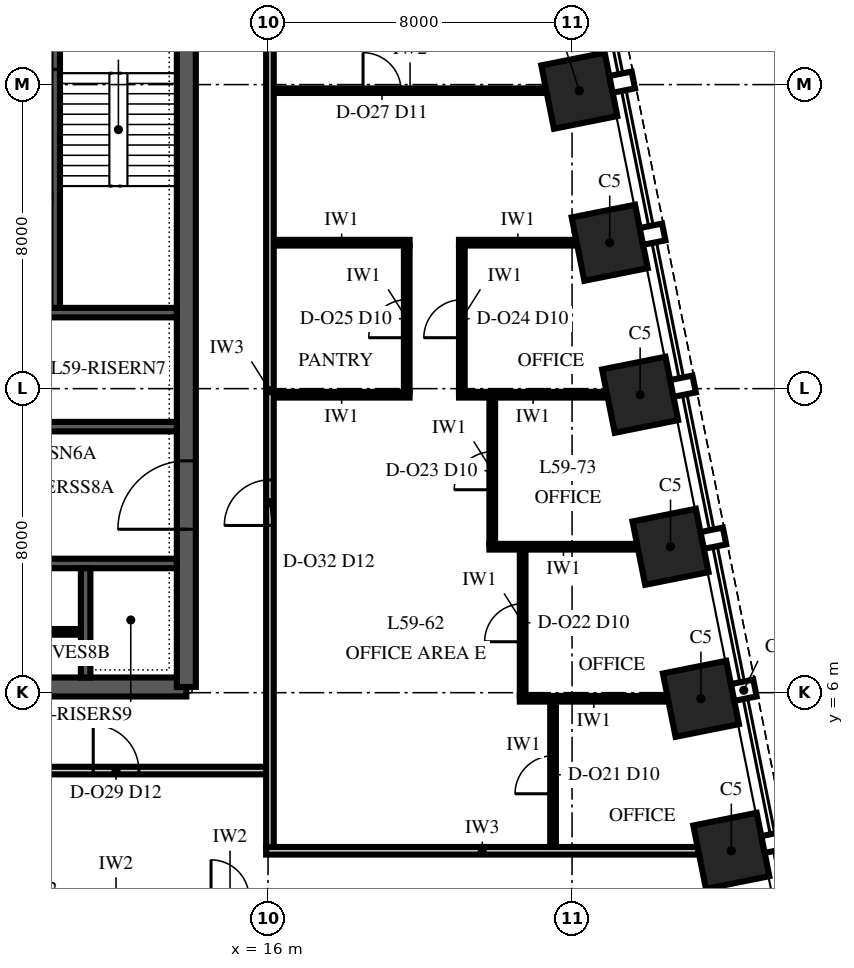
"""IFC4 building model, lengths in metres.
Left out: names, types, materials, properties, quantities, classifications, styles, units other than length and angle.
Written with IfcOpenShell. Run it as: python <this file> out.ifc"""

import sys

from ifc_helpers import new_model, si_unit, direction, frame, frame_2d, origin, origin_2d, place, context, subcontext, project, spatial, polyline, rectangle, outline, extrude, element, fill, save


model = new_model("IFC4")
c1 = context("Model", 3, precision=1e-05, world=origin(), true_north=direction((0.0, 1.0)))
c2 = subcontext(c1, "Body", "Model", "MODEL_VIEW")
j1 = project(units=[si_unit("LENGTHUNIT", "METRE"), si_unit("PLANEANGLEUNIT", "RADIAN")], contexts=[c1])
p1 = place(None, origin())
s1 = spatial("IfcSite", under=j1, at=p1, CompositionType="ELEMENT")
p2 = place(p1, origin())
s2 = spatial("IfcBuilding", under=s1, at=p2, CompositionType="ELEMENT")
p3 = place(p2, frame((0.0, 0.0, 256.0)))
s3 = spatial("IfcBuildingStorey", under=s2, at=p3, CompositionType="ELEMENT", Elevation=256.0)
for number, where, z_axis, x_axis in (
    (1, (28.191, 1.838, 0.0), (0.0, 0.0, 1.0), (-0.196, 0.981, 0.0)),
    (2, (27.391, 5.838, 0.0), (0.0, 0.0, 1.0), (-0.196, 0.981, 0.0)),
    (3, (26.591, 9.838, 0.0), (0.0, 0.0, 1.0), (-0.196, 0.981, 0.0)),
    (4, (25.791, 13.838, 0.0), (0.0, 0.0, 1.0), (-0.196, 0.981, 0.0)),
    (5, (24.991, 17.838, 0.0), (0.0, 0.0, 1.0), (-0.196, 0.981, 0.0)),
    (6, (24.191, 21.838, 0.0), (0.0, 0.0, 1.0), (-0.196, 0.981, 0.0)),
):
    element("IfcColumn", number, at=place(p3, frame(where, z_axis=z_axis, x_axis=x_axis)), inside=s3, PredefinedType="COLUMN", context=c2, shape_type="SweptSolid", body=[
        extrude(rectangle(XDim=1.7, YDim=1.7, at=origin_2d()), origin(), (0.0, 0.0, 1.0), 4.0),
    ])
p4 = place(p3, frame((-13.85, 6.15, 0.0), z_axis=(0.0, 0.0, 1.0), x_axis=(1.0, 0.0, 0.0)))
e7 = element("IfcWall", 7, at=p4, inside=s3, PredefinedType="SHEAR", context=c2, shape_type="SweptSolid", body=[
    extrude(rectangle(XDim=27.7, YDim=0.5, at=frame_2d((13.85, 0.0))), origin(), (0.0, 0.0, 1.0), 4.0),
])
p5 = place(p3, frame((13.85, 6.15, 0.0), z_axis=(0.0, 0.0, 1.0), x_axis=(0.0, 1.0, 0.0)))
e8 = element("IfcWall", 8, at=p5, inside=s3, PredefinedType="SHEAR", context=c2, shape_type="SweptSolid", body=[
    extrude(outline(polyline([(0.0, -0.25), (17.7, -0.25), (17.7, 0.0), (17.45, 0.0), (17.45, 0.25), (0.25, 0.25), (0.25, 0.0), (0.0, 0.0), (0.0, -0.25)])), origin(), (0.0, 0.0, 1.0), 4.0),
])
p6 = place(p5, frame((4.15, 0.0, 0.0)))
e9 = element("IfcOpeningElement", 9, at=p6, cuts=e8, PredefinedType="OPENING", context=c2, shape_type="SweptSolid", body=[
    extrude(rectangle(XDim=1.8, YDim=2.4, at=frame_2d((0.9, 1.2))), frame((0.0, 0.265, 0.0), z_axis=(0.0, -1.0, 0.0), x_axis=(1.0, 0.0, 0.0)), (0.0, 0.0, 1.0), 0.53),
])
p7 = place(p3, frame((-13.6, 9.4, 0.0), z_axis=(0.0, 0.0, 1.0), x_axis=(1.0, 0.0, 0.0)))
e10 = element("IfcWall", 10, at=p7, inside=s3, PredefinedType="SHEAR", context=c2, shape_type="SweptSolid", body=[
    extrude(rectangle(XDim=27.2, YDim=0.25, at=frame_2d((13.6, 0.0))), origin(), (0.0, 0.0, 1.0), 4.0),
])
p8 = place(p7, frame((8.85, 0.0, 0.0)))
e11 = element("IfcOpeningElement", 11, at=p8, cuts=e10, PredefinedType="OPENING", context=c2, shape_type="SweptSolid", body=[
    extrude(rectangle(XDim=1.1, YDim=2.1, at=frame_2d((0.55, 1.05))), frame((0.0, 0.14, 0.0), z_axis=(0.0, -1.0, 0.0), x_axis=(1.0, 0.0, 0.0)), (0.0, 0.0, 1.0), 0.28),
])
p9 = place(p7, frame((11.65, 0.0, 0.0)))
e12 = element("IfcOpeningElement", 12, at=p9, cuts=e10, PredefinedType="OPENING", context=c2, shape_type="SweptSolid", body=[
    extrude(rectangle(XDim=1.1, YDim=2.1, at=frame_2d((0.55, 1.05))), frame((0.0, 0.14, 0.0), z_axis=(0.0, -1.0, 0.0), x_axis=(1.0, 0.0, 0.0)), (0.0, 0.0, 1.0), 0.28),
])
p10 = place(p7, frame((14.45, 0.0, 0.0)))
e13 = element("IfcOpeningElement", 13, at=p10, cuts=e10, PredefinedType="OPENING", context=c2, shape_type="SweptSolid", body=[
    extrude(rectangle(XDim=1.1, YDim=2.1, at=frame_2d((0.55, 1.05))), frame((0.0, 0.14, 0.0), z_axis=(0.0, -1.0, 0.0), x_axis=(1.0, 0.0, 0.0)), (0.0, 0.0, 1.0), 0.28),
])
p11 = place(p7, frame((0.55, 0.0, 0.0)))
e14 = element("IfcOpeningElement", 14, at=p11, cuts=e10, PredefinedType="OPENING", context=c2, shape_type="SweptSolid", body=[
    extrude(rectangle(XDim=0.9, YDim=2.1, at=frame_2d((0.45, 1.05))), frame((0.0, 0.14, 0.0), z_axis=(0.0, -1.0, 0.0), x_axis=(1.0, 0.0, 0.0)), (0.0, 0.0, 1.0), 0.28),
])
p12 = place(p7, frame((3.35, 0.0, 0.0)))
e15 = element("IfcOpeningElement", 15, at=p12, cuts=e10, PredefinedType="OPENING", context=c2, shape_type="SweptSolid", body=[
    extrude(rectangle(XDim=0.9, YDim=2.1, at=frame_2d((0.45, 1.05))), frame((0.0, 0.14, 0.0), z_axis=(0.0, -1.0, 0.0), x_axis=(1.0, 0.0, 0.0)), (0.0, 0.0, 1.0), 0.28),
])
p13 = place(p7, frame((6.15, 0.0, 0.0)))
e16 = element("IfcOpeningElement", 16, at=p13, cuts=e10, PredefinedType="OPENING", context=c2, shape_type="SweptSolid", body=[
    extrude(rectangle(XDim=0.9, YDim=2.1, at=frame_2d((0.45, 1.05))), frame((0.0, 0.14, 0.0), z_axis=(0.0, -1.0, 0.0), x_axis=(1.0, 0.0, 0.0)), (0.0, 0.0, 1.0), 0.28),
])
p14 = place(p7, frame((17.35, 0.0, 0.0)))
e17 = element("IfcOpeningElement", 17, at=p14, cuts=e10, PredefinedType="OPENING", context=c2, shape_type="SweptSolid", body=[
    extrude(rectangle(XDim=0.9, YDim=2.1, at=frame_2d((0.45, 1.05))), frame((0.0, 0.14, 0.0), z_axis=(0.0, -1.0, 0.0), x_axis=(1.0, 0.0, 0.0)), (0.0, 0.0, 1.0), 0.28),
])
p15 = place(p7, frame((20.15, 0.0, 0.0)))
e18 = element("IfcOpeningElement", 18, at=p15, cuts=e10, PredefinedType="OPENING", context=c2, shape_type="SweptSolid", body=[
    extrude(rectangle(XDim=0.9, YDim=2.1, at=frame_2d((0.45, 1.05))), frame((0.0, 0.14, 0.0), z_axis=(0.0, -1.0, 0.0), x_axis=(1.0, 0.0, 0.0)), (0.0, 0.0, 1.0), 0.28),
])
p16 = place(p7, frame((22.95, 0.0, 0.0)))
e19 = element("IfcOpeningElement", 19, at=p16, cuts=e10, PredefinedType="OPENING", context=c2, shape_type="SweptSolid", body=[
    extrude(rectangle(XDim=0.9, YDim=2.1, at=frame_2d((0.45, 1.05))), frame((0.0, 0.14, 0.0), z_axis=(0.0, -1.0, 0.0), x_axis=(1.0, 0.0, 0.0)), (0.0, 0.0, 1.0), 0.28),
])
p17 = place(p3, frame((-13.6, 13.0, 0.0), z_axis=(0.0, 0.0, 1.0), x_axis=(1.0, 0.0, 0.0)))
e20 = element("IfcWall", 20, at=p17, inside=s3, PredefinedType="SHEAR", context=c2, shape_type="SweptSolid", body=[
    extrude(rectangle(XDim=27.2, YDim=0.25, at=frame_2d((13.6, 0.0))), origin(), (0.0, 0.0, 1.0), 4.0),
])
p18 = place(p17, frame((16.75, 0.0, 0.0)))
e21 = element("IfcOpeningElement", 21, at=p18, cuts=e20, PredefinedType="OPENING", context=c2, shape_type="SweptSolid", body=[
    extrude(rectangle(XDim=0.9, YDim=2.1, at=frame_2d((0.45, 1.05))), frame((0.0, 0.14, 0.0), z_axis=(0.0, -1.0, 0.0), x_axis=(1.0, 0.0, 0.0)), (0.0, 0.0, 1.0), 0.28),
])
p19 = place(p17, frame((21.15, 0.0, 0.0)))
e22 = element("IfcOpeningElement", 22, at=p19, cuts=e20, PredefinedType="OPENING", context=c2, shape_type="SweptSolid", body=[
    extrude(rectangle(XDim=0.9, YDim=2.1, at=frame_2d((0.45, 1.05))), frame((0.0, 0.14, 0.0), z_axis=(0.0, -1.0, 0.0), x_axis=(1.0, 0.0, 0.0)), (0.0, 0.0, 1.0), 0.28),
])
p20 = place(p17, frame((0.55, 0.0, 0.0)))
e23 = element("IfcOpeningElement", 23, at=p20, cuts=e20, PredefinedType="OPENING", context=c2, shape_type="SweptSolid", body=[
    extrude(rectangle(XDim=0.9, YDim=2.1, at=frame_2d((0.45, 1.05))), frame((0.0, 0.14, 0.0), z_axis=(0.0, -1.0, 0.0), x_axis=(1.0, 0.0, 0.0)), (0.0, 0.0, 1.0), 0.28),
])
p21 = place(p17, frame((3.35, 0.0, 0.0)))
e24 = element("IfcOpeningElement", 24, at=p21, cuts=e20, PredefinedType="OPENING", context=c2, shape_type="SweptSolid", body=[
    extrude(rectangle(XDim=0.9, YDim=2.1, at=frame_2d((0.45, 1.05))), frame((0.0, 0.14, 0.0), z_axis=(0.0, -1.0, 0.0), x_axis=(1.0, 0.0, 0.0)), (0.0, 0.0, 1.0), 0.28),
])
p22 = place(p17, frame((6.15, 0.0, 0.0)))
e25 = element("IfcOpeningElement", 25, at=p22, cuts=e20, PredefinedType="OPENING", context=c2, shape_type="SweptSolid", body=[
    extrude(rectangle(XDim=0.9, YDim=2.1, at=frame_2d((0.45, 1.05))), frame((0.0, 0.14, 0.0), z_axis=(0.0, -1.0, 0.0), x_axis=(1.0, 0.0, 0.0)), (0.0, 0.0, 1.0), 0.28),
])
p23 = place(p3, frame((-13.6, 16.0, 0.0), z_axis=(0.0, 0.0, 1.0), x_axis=(1.0, 0.0, 0.0)))
e26 = element("IfcWall", 26, at=p23, inside=s3, PredefinedType="SHEAR", context=c2, shape_type="SweptSolid", body=[
    extrude(rectangle(XDim=27.2, YDim=0.25, at=frame_2d((13.6, 0.0))), origin(), (0.0, 0.0, 1.0), 4.0),
])
p24 = place(p3, frame((11.2, 6.4, 0.0), z_axis=(0.0, 0.0, 1.0), x_axis=(0.0, 1.0, 0.0)))
e27 = element("IfcWall", 27, at=p24, inside=s3, PredefinedType="SHEAR", context=c2, shape_type="SweptSolid", body=[
    extrude(rectangle(XDim=2.875, YDim=0.25, at=frame_2d((1.438, 0.0))), origin(), (0.0, 0.0, 1.0), 4.0),
])
p25 = place(p3, frame((10.4, 16.125, 0.0), z_axis=(0.0, 0.0, 1.0), x_axis=(0.0, 1.0, 0.0)))
e28 = element("IfcWall", 28, at=p25, inside=s3, PredefinedType="SHEAR", context=c2, shape_type="SweptSolid", body=[
    extrude(rectangle(XDim=7.475, YDim=0.25, at=frame_2d((3.738, 0.0))), origin(), (0.0, 0.0, 1.0), 4.0),
])
p26 = place(p25, frame((6.275, 0.0, 0.0)))
e29 = element("IfcOpeningElement", 29, at=p26, cuts=e28, PredefinedType="OPENING", context=c2, shape_type="SweptSolid", body=[
    extrude(rectangle(XDim=1.0, YDim=2.1, at=frame_2d((0.5, 1.05))), frame((0.0, 0.14, 0.0), z_axis=(0.0, -1.0, 0.0), x_axis=(1.0, 0.0, 0.0)), (0.0, 0.0, 1.0), 0.28),
])
p27 = place(p3, frame((8.525, 7.6, 0.0), z_axis=(0.0, 0.0, 1.0), x_axis=(1.0, 0.0, 0.0)))
e30 = element("IfcWall", 30, at=p27, inside=s3, PredefinedType="PARTITIONING", context=c2, shape_type="SweptSolid", body=[
    extrude(rectangle(XDim=2.55, YDim=0.15, at=frame_2d((1.275, 0.0))), origin(), (0.0, 0.0, 1.0), 3.85),
])
p28 = place(p27, frame((0.825, 0.0, 0.0)))
e31 = element("IfcOpeningElement", 31, at=p28, cuts=e30, PredefinedType="OPENING", context=c2, shape_type="SweptSolid", body=[
    extrude(rectangle(XDim=0.9, YDim=2.1, at=frame_2d((0.45, 1.05))), frame((0.0, 0.09, 0.0), z_axis=(0.0, -1.0, 0.0), x_axis=(1.0, 0.0, 0.0)), (0.0, 0.0, 1.0), 0.18),
])
p29 = place(p3, frame((15.95, 1.84, 0.0), z_axis=(0.0, 0.0, 1.0), x_axis=(1.0, 0.0, 0.0)))
e32 = element("IfcWall", 32, at=p29, inside=s3, PredefinedType="PARTITIONING", context=c2, shape_type="SweptSolid", body=[
    extrude(rectangle(XDim=11.374, YDim=0.2, at=frame_2d((5.687, 0.0))), origin(), (0.0, 0.0, 1.0), 3.23),
])
p30 = place(p3, frame((-15.95, 3.95, 0.0), z_axis=(0.0, 0.0, 1.0), x_axis=(1.0, 0.0, 0.0)))
e33 = element("IfcWall", 33, at=p30, inside=s3, PredefinedType="PARTITIONING", context=c2, shape_type="SweptSolid", body=[
    extrude(rectangle(XDim=31.9, YDim=0.2, at=frame_2d((15.95, 0.0))), origin(), (0.0, 0.0, 1.0), 3.23),
])
p31 = place(p30, frame((3.35, 0.0, 0.0)))
e34 = element("IfcOpeningElement", 34, at=p31, cuts=e33, PredefinedType="OPENING", context=c2, shape_type="SweptSolid", body=[
    extrude(rectangle(XDim=1.2, YDim=2.4, at=frame_2d((0.6, 1.2))), frame((0.0, 0.115, 0.0), z_axis=(0.0, -1.0, 0.0), x_axis=(1.0, 0.0, 0.0)), (0.0, 0.0, 1.0), 0.23),
])
p32 = place(p30, frame((27.35, 0.0, 0.0)))
e35 = element("IfcOpeningElement", 35, at=p32, cuts=e33, PredefinedType="OPENING", context=c2, shape_type="SweptSolid", body=[
    extrude(rectangle(XDim=1.2, YDim=2.4, at=frame_2d((0.6, 1.2))), frame((0.0, 0.115, 0.0), z_axis=(0.0, -1.0, 0.0), x_axis=(1.0, 0.0, 0.0)), (0.0, 0.0, 1.0), 0.23),
])
p33 = place(p30, frame((15.35, 0.0, 0.0)))
e36 = element("IfcOpeningElement", 36, at=p33, cuts=e33, PredefinedType="OPENING", context=c2, shape_type="SweptSolid", body=[
    extrude(rectangle(XDim=1.2, YDim=2.4, at=frame_2d((0.6, 1.2))), frame((0.0, 0.115, 0.0), z_axis=(0.0, -1.0, 0.0), x_axis=(1.0, 0.0, 0.0)), (0.0, 0.0, 1.0), 0.23),
])
p34 = place(p3, frame((22.625, 5.84, 0.0), z_axis=(0.0, 0.0, 1.0), x_axis=(1.0, 0.0, 0.0)))
e37 = element("IfcWall", 37, at=p34, inside=s3, PredefinedType="PARTITIONING", context=c2, shape_type="SweptSolid", body=[
    extrude(rectangle(XDim=3.899, YDim=0.15, at=frame_2d((1.949, 0.0))), origin(), (0.0, 0.0, 1.0), 2.842),
])
p35 = place(p3, frame((21.825, 9.84, 0.0), z_axis=(0.0, 0.0, 1.0), x_axis=(1.0, 0.0, 0.0)))
e38 = element("IfcWall", 38, at=p35, inside=s3, PredefinedType="PARTITIONING", context=c2, shape_type="SweptSolid", body=[
    extrude(rectangle(XDim=3.899, YDim=0.15, at=frame_2d((1.949, 0.0))), origin(), (0.0, 0.0, 1.0), 3.23),
])
p36 = place(p3, frame((16.15, 13.84, 0.0), z_axis=(0.0, 0.0, 1.0), x_axis=(1.0, 0.0, 0.0)))
e39 = element("IfcWall", 39, at=p36, inside=s3, PredefinedType="PARTITIONING", context=c2, shape_type="SweptSolid", body=[
    extrude(rectangle(XDim=3.575, YDim=0.15, at=frame_2d((1.788, 0.0))), origin(), (0.0, 0.0, 1.0), 3.85),
])
p37 = place(p3, frame((21.025, 13.84, 0.0), z_axis=(0.0, 0.0, 1.0), x_axis=(1.0, 0.0, 0.0)))
e40 = element("IfcWall", 40, at=p37, inside=s3, PredefinedType="PARTITIONING", context=c2, shape_type="SweptSolid", body=[
    extrude(rectangle(XDim=3.899, YDim=0.15, at=frame_2d((1.949, 0.0))), origin(), (0.0, 0.0, 1.0), 3.23),
])
p38 = place(p3, frame((16.15, 17.84, 0.0), z_axis=(0.0, 0.0, 1.0), x_axis=(1.0, 0.0, 0.0)))
e41 = element("IfcWall", 41, at=p38, inside=s3, PredefinedType="PARTITIONING", context=c2, shape_type="SweptSolid", body=[
    extrude(rectangle(XDim=3.575, YDim=0.15, at=frame_2d((1.788, 0.0))), origin(), (0.0, 0.0, 1.0), 3.23),
])
p39 = place(p3, frame((21.025, 17.84, 0.0), z_axis=(0.0, 0.0, 1.0), x_axis=(1.0, 0.0, 0.0)))
e42 = element("IfcWall", 42, at=p39, inside=s3, PredefinedType="PARTITIONING", context=c2, shape_type="SweptSolid", body=[
    extrude(rectangle(XDim=3.099, YDim=0.15, at=frame_2d((1.549, 0.0))), origin(), (0.0, 0.0, 1.0), 3.23),
])
p40 = place(p3, frame((16.15, 21.84, 0.0), z_axis=(0.0, 0.0, 1.0), x_axis=(1.0, 0.0, 0.0)))
e43 = element("IfcWall", 43, at=p40, inside=s3, PredefinedType="PARTITIONING", context=c2, shape_type="SweptSolid", body=[
    extrude(rectangle(XDim=7.174, YDim=0.12, at=frame_2d((3.587, 0.0))), origin(), (0.0, 0.0, 1.0), 3.23),
])
p41 = place(p40, frame((2.35, 0.0, 0.0)))
e44 = element("IfcOpeningElement", 44, at=p41, cuts=e43, PredefinedType="OPENING", context=c2, shape_type="SweptSolid", body=[
    extrude(rectangle(XDim=1.0, YDim=2.4, at=frame_2d((0.5, 1.2))), frame((0.0, 0.075, 0.0), z_axis=(0.0, -1.0, 0.0), x_axis=(1.0, 0.0, 0.0)), (0.0, 0.0, 1.0), 0.15),
])
p42 = place(p3, frame((16.05, 1.94, 0.0), z_axis=(0.0, 0.0, 1.0), x_axis=(0.0, 1.0, 0.0)))
e45 = element("IfcWall", 45, at=p42, inside=s3, PredefinedType="PARTITIONING", context=c2, shape_type="SweptSolid", body=[
    extrude(rectangle(XDim=24.01, YDim=0.2, at=frame_2d((12.005, 0.0))), origin(), (0.0, 0.0, 1.0), 2.842),
])
p43 = place(p42, frame((8.46, 0.0, 0.0)))
e46 = element("IfcOpeningElement", 46, at=p43, cuts=e45, PredefinedType="OPENING", context=c2, shape_type="SweptSolid", body=[
    extrude(rectangle(XDim=1.2, YDim=2.4, at=frame_2d((0.6, 1.2))), frame((0.0, 0.115, 0.0), z_axis=(0.0, -1.0, 0.0), x_axis=(1.0, 0.0, 0.0)), (0.0, 0.0, 1.0), 0.23),
])
p44 = place(p3, frame((19.65, 13.915, 0.0), z_axis=(0.0, 0.0, 1.0), x_axis=(0.0, 1.0, 0.0)))
e47 = element("IfcWall", 47, at=p44, inside=s3, PredefinedType="PARTITIONING", context=c2, shape_type="SweptSolid", body=[
    extrude(rectangle(XDim=3.85, YDim=0.15, at=frame_2d((1.925, 0.0))), origin(), (0.0, 0.0, 1.0), 3.23),
])
p45 = place(p44, frame((1.425, 0.0, 0.0)))
e48 = element("IfcOpeningElement", 48, at=p45, cuts=e47, PredefinedType="OPENING", context=c2, shape_type="SweptSolid", body=[
    extrude(rectangle(XDim=1.0, YDim=2.3, at=frame_2d((0.5, 1.15))), frame((0.0, 0.09, 0.0), z_axis=(0.0, -1.0, 0.0), x_axis=(1.0, 0.0, 0.0)), (0.0, 0.0, 1.0), 0.18),
])
p46 = place(p3, frame((21.1, 13.915, 0.0), z_axis=(0.0, 0.0, 1.0), x_axis=(0.0, 1.0, 0.0)))
e49 = element("IfcWall", 49, at=p46, inside=s3, PredefinedType="PARTITIONING", context=c2, shape_type="SweptSolid", body=[
    extrude(rectangle(XDim=3.85, YDim=0.15, at=frame_2d((1.925, 0.0))), origin(), (0.0, 0.0, 1.0), 3.23),
])
p47 = place(p46, frame((1.425, 0.0, 0.0)))
e50 = element("IfcOpeningElement", 50, at=p47, cuts=e49, PredefinedType="OPENING", context=c2, shape_type="SweptSolid", body=[
    extrude(rectangle(XDim=1.0, YDim=2.3, at=frame_2d((0.5, 1.15))), frame((0.0, 0.09, 0.0), z_axis=(0.0, -1.0, 0.0), x_axis=(1.0, 0.0, 0.0)), (0.0, 0.0, 1.0), 0.18),
])
p48 = place(p3, frame((21.9, 9.915, 0.0), z_axis=(0.0, 0.0, 1.0), x_axis=(0.0, 1.0, 0.0)))
e51 = element("IfcWall", 51, at=p48, inside=s3, PredefinedType="PARTITIONING", context=c2, shape_type="SweptSolid", body=[
    extrude(rectangle(XDim=3.85, YDim=0.15, at=frame_2d((1.925, 0.0))), origin(), (0.0, 0.0, 1.0), 3.85),
])
p49 = place(p48, frame((1.425, 0.0, 0.0)))
e52 = element("IfcOpeningElement", 52, at=p49, cuts=e51, PredefinedType="OPENING", context=c2, shape_type="SweptSolid", body=[
    extrude(rectangle(XDim=1.0, YDim=2.3, at=frame_2d((0.5, 1.15))), frame((0.0, 0.09, 0.0), z_axis=(0.0, -1.0, 0.0), x_axis=(1.0, 0.0, 0.0)), (0.0, 0.0, 1.0), 0.18),
])
p50 = place(p3, frame((22.7, 5.915, 0.0), z_axis=(0.0, 0.0, 1.0), x_axis=(0.0, 1.0, 0.0)))
e53 = element("IfcWall", 53, at=p50, inside=s3, PredefinedType="PARTITIONING", context=c2, shape_type="SweptSolid", body=[
    extrude(rectangle(XDim=3.85, YDim=0.15, at=frame_2d((1.925, 0.0))), origin(), (0.0, 0.0, 1.0), 2.842),
])
p51 = place(p50, frame((1.425, 0.0, 0.0)))
e54 = element("IfcOpeningElement", 54, at=p51, cuts=e53, PredefinedType="OPENING", context=c2, shape_type="SweptSolid", body=[
    extrude(rectangle(XDim=1.0, YDim=2.3, at=frame_2d((0.5, 1.15))), frame((0.0, 0.09, 0.0), z_axis=(0.0, -1.0, 0.0), x_axis=(1.0, 0.0, 0.0)), (0.0, 0.0, 1.0), 0.18),
])
p52 = place(p3, frame((23.5, 1.94, 0.0), z_axis=(0.0, 0.0, 1.0), x_axis=(0.0, 1.0, 0.0)))
e55 = element("IfcWall", 55, at=p52, inside=s3, PredefinedType="PARTITIONING", context=c2, shape_type="SweptSolid", body=[
    extrude(rectangle(XDim=3.825, YDim=0.15, at=frame_2d((1.913, 0.0))), origin(), (0.0, 0.0, 1.0), 3.85),
])
p53 = place(p52, frame((1.4, 0.0, 0.0)))
e56 = element("IfcOpeningElement", 56, at=p53, cuts=e55, PredefinedType="OPENING", context=c2, shape_type="SweptSolid", body=[
    extrude(rectangle(XDim=1.0, YDim=2.3, at=frame_2d((0.5, 1.15))), frame((0.0, 0.09, 0.0), z_axis=(0.0, -1.0, 0.0), x_axis=(1.0, 0.0, 0.0)), (0.0, 0.0, 1.0), 0.18),
])
p54 = place(p6, origin())
e57 = element("IfcDoor", 57, at=p54, inside=s3, OperationType="DOUBLE_DOOR_SINGLE_SWING", PredefinedType="DOOR", context=c2, shape_type="SweptSolid", body=[
    extrude(rectangle(XDim=1.8, YDim=2.4, at=frame_2d((0.9, 1.2))), frame((0.0, 0.25, 0.0), z_axis=(0.0, -1.0, 0.0), x_axis=(1.0, 0.0, 0.0)), (0.0, 0.0, 1.0), 0.5),
])
fill(e9, e57)
p55 = place(p26, origin())
e58 = element("IfcDoor", 58, at=p55, inside=s3, OperationType="SINGLE_SWING_LEFT", PredefinedType="DOOR", context=c2, shape_type="SweptSolid", body=[
    extrude(rectangle(XDim=1.0, YDim=2.1, at=frame_2d((0.5, 1.05))), frame((0.0, 0.125, 0.0), z_axis=(0.0, -1.0, 0.0), x_axis=(1.0, 0.0, 0.0)), (0.0, 0.0, 1.0), 0.25),
])
fill(e29, e58)
p56 = place(p53, origin())
e59 = element("IfcDoor", 59, at=p56, inside=s3, OperationType="SINGLE_SWING_LEFT", PredefinedType="DOOR", context=c2, shape_type="SweptSolid", body=[
    extrude(rectangle(XDim=1.0, YDim=2.3, at=frame_2d((0.5, 1.15))), frame((0.0, 0.075, 0.0), z_axis=(0.0, -1.0, 0.0), x_axis=(1.0, 0.0, 0.0)), (0.0, 0.0, 1.0), 0.149),
])
fill(e56, e59)
p57 = place(p51, origin())
e60 = element("IfcDoor", 60, at=p57, inside=s3, OperationType="SINGLE_SWING_LEFT", PredefinedType="DOOR", context=c2, shape_type="SweptSolid", body=[
    extrude(rectangle(XDim=1.0, YDim=2.3, at=frame_2d((0.5, 1.15))), frame((0.0, 0.075, 0.0), z_axis=(0.0, -1.0, 0.0), x_axis=(1.0, 0.0, 0.0)), (0.0, 0.0, 1.0), 0.149),
])
fill(e54, e60)
p58 = place(p49, origin())
e61 = element("IfcDoor", 61, at=p58, inside=s3, OperationType="SINGLE_SWING_LEFT", PredefinedType="DOOR", context=c2, shape_type="SweptSolid", body=[
    extrude(rectangle(XDim=1.0, YDim=2.3, at=frame_2d((0.5, 1.15))), frame((0.0, 0.075, 0.0), z_axis=(0.0, -1.0, 0.0), x_axis=(1.0, 0.0, 0.0)), (0.0, 0.0, 1.0), 0.149),
])
fill(e52, e61)
p59 = place(p47, origin())
e62 = element("IfcDoor", 62, at=p59, inside=s3, OperationType="SINGLE_SWING_LEFT", PredefinedType="DOOR", context=c2, shape_type="SweptSolid", body=[
    extrude(rectangle(XDim=1.0, YDim=2.3, at=frame_2d((0.5, 1.15))), frame((0.0, 0.075, 0.0), z_axis=(0.0, -1.0, 0.0), x_axis=(1.0, 0.0, 0.0)), (0.0, 0.0, 1.0), 0.149),
])
fill(e50, e62)
p60 = place(p45, origin())
e63 = element("IfcDoor", 63, at=p60, inside=s3, OperationType="SINGLE_SWING_LEFT", PredefinedType="DOOR", context=c2, shape_type="SweptSolid", body=[
    extrude(rectangle(XDim=1.0, YDim=2.3, at=frame_2d((0.5, 1.15))), frame((0.0, 0.075, 0.0), z_axis=(0.0, -1.0, 0.0), x_axis=(1.0, 0.0, 0.0)), (0.0, 0.0, 1.0), 0.149),
])
fill(e48, e63)
p61 = place(p41, origin())
e64 = element("IfcDoor", 64, at=p61, inside=s3, OperationType="SINGLE_SWING_RIGHT", PredefinedType="DOOR", context=c2, shape_type="SweptSolid", body=[
    extrude(rectangle(XDim=1.0, YDim=2.4, at=frame_2d((0.5, 1.2))), frame((0.0, 0.06, 0.0), z_axis=(0.0, -1.0, 0.0), x_axis=(1.0, 0.0, 0.0)), (0.0, 0.0, 1.0), 0.12),
])
fill(e44, e64)
p62 = place(p32, origin())
e65 = element("IfcDoor", 65, at=p62, inside=s3, OperationType="SINGLE_SWING_LEFT", PredefinedType="DOOR", context=c2, shape_type="SweptSolid", body=[
    extrude(rectangle(XDim=1.2, YDim=2.4, at=frame_2d((0.6, 1.2))), frame((0.0, 0.1, 0.0), z_axis=(0.0, -1.0, 0.0), x_axis=(1.0, 0.0, 0.0)), (0.0, 0.0, 1.0), 0.199),
])
fill(e35, e65)
p63 = place(p43, origin())
e66 = element("IfcDoor", 66, at=p63, inside=s3, OperationType="SINGLE_SWING_LEFT", PredefinedType="DOOR", context=c2, shape_type="SweptSolid", body=[
    extrude(rectangle(XDim=1.2, YDim=2.4, at=frame_2d((0.6, 1.2))), frame((0.0, 0.1, 0.0), z_axis=(0.0, -1.0, 0.0), x_axis=(1.0, 0.0, 0.0)), (0.0, 0.0, 1.0), 0.199),
])
fill(e46, e66)
save(model, sys.argv[1])
